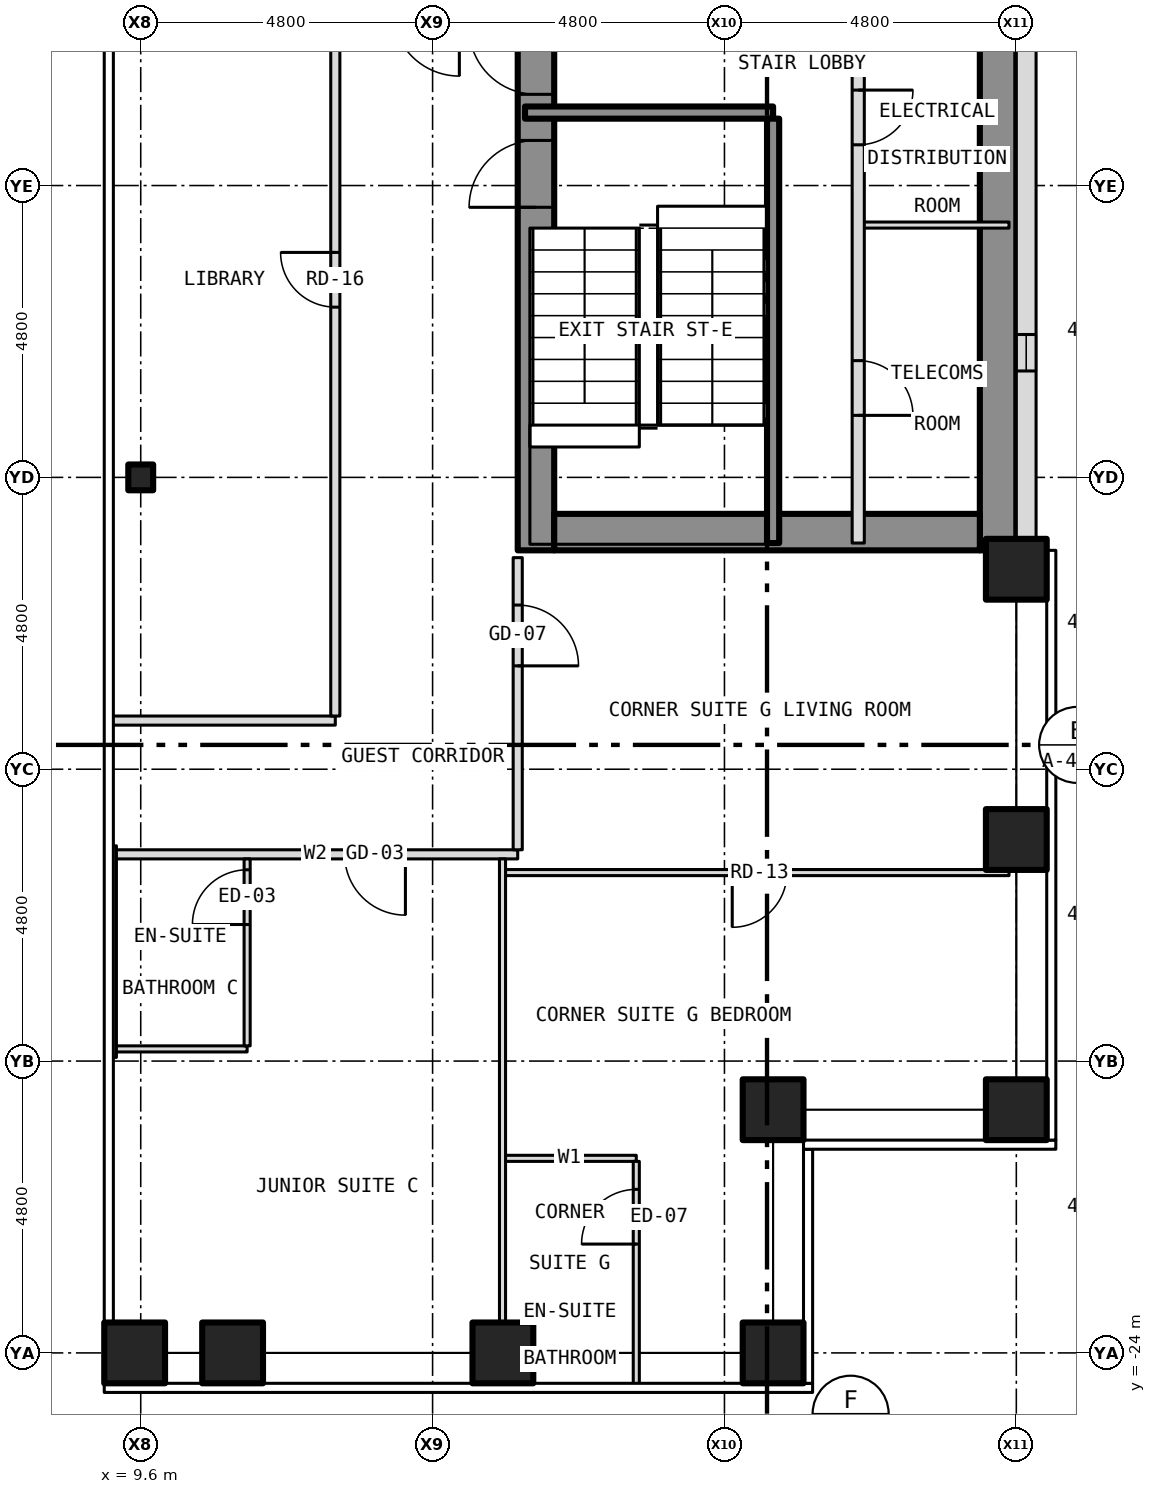
"""IFC4 building model, lengths in metres.
Left out: names, types, materials, properties, quantities, classifications, styles, units other than length and angle.
Written with IfcOpenShell. Run it as: python <this file> out.ifc"""

import sys

from ifc_helpers import new_model, si_unit, direction, frame, frame_2d, origin, origin_2d, place, context, subcontext, project, spatial, rectangle, hollow_rectangle, i_section, extrude, element, fill, save


model = new_model("IFC4")
c1 = context("Model", 3, precision=1e-05, world=origin(), true_north=direction((0.0, 1.0)))
c2 = subcontext(c1, "Body", "Model", "MODEL_VIEW")
j1 = project(units=[si_unit("LENGTHUNIT", "METRE"), si_unit("PLANEANGLEUNIT", "RADIAN")], contexts=[c1])
p1 = place(None, origin())
s1 = spatial("IfcSite", under=j1, at=p1, CompositionType="ELEMENT")
p2 = place(p1, origin())
s2 = spatial("IfcBuilding", under=s1, at=p2, CompositionType="ELEMENT")
p3 = place(p2, frame((0.0, 0.0, 67.0)))
s3 = spatial("IfcBuildingStorey", under=s2, at=p3, CompositionType="ELEMENT", Elevation=67.0)
for number, where, z_axis, x_axis in (
    (1, (11.111, -24.0, -0.15), (0.0, 0.0, 1.0), (1.0, 0.0, 0.0)),
    (2, (15.556, -24.0, -0.15), (0.0, 0.0, 1.0), (1.0, 0.0, 0.0)),
    (3, (20.0, -24.0, -0.15), (0.0, 0.0, 1.0), (1.0, 0.0, 0.0)),
    (4, (24.0, -20.0, -0.15), (0.0, 0.0, 1.0), (1.0, 0.0, 0.0)),
    (5, (24.0, -15.556, -0.15), (0.0, 0.0, 1.0), (1.0, 0.0, 0.0)),
    (6, (24.0, -11.111, -0.15), (0.0, 0.0, 1.0), (1.0, 0.0, 0.0)),
    (7, (20.0, -20.0, -0.15), (0.0, 0.0, 1.0), (1.0, 0.0, 0.0)),
    (8, (9.5, -24.0, -0.15), (0.0, 0.0, 1.0), (1.0, 0.0, 0.0)),
):
    element("IfcColumn", number, at=place(p3, frame(where, z_axis=z_axis, x_axis=x_axis)), inside=s3, PredefinedType="COLUMN", context=c2, shape_type="SweptSolid", body=[
        extrude(hollow_rectangle(XDim=1.0, YDim=1.0, WallThickness=0.06, at=origin_2d()), origin(), (0.0, 0.0, 1.0), 3.5),
    ])
p4 = place(p3, frame((9.6, -9.6, -0.15), z_axis=(0.0, 0.0, 1.0), x_axis=(1.0, 0.0, 0.0)))
e9 = element("IfcColumn", 9, at=p4, inside=s3, PredefinedType="COLUMN", context=c2, shape_type="SweptSolid", body=[
    extrude(i_section(OverallWidth=0.409, OverallDepth=0.424, WebThickness=0.033, FlangeThickness=0.052, at=origin_2d()), origin(), (0.0, 0.0, 1.0), 3.5),
])
p5 = place(p3, frame((16.1, -10.8, 0.0), z_axis=(0.0, 0.0, 1.0), x_axis=(0.0, 1.0, 0.0)))
e10 = element("IfcWall", 10, at=p5, inside=s3, PredefinedType="SHEAR", context=c2, shape_type="SweptSolid", body=[
    extrude(rectangle(XDim=21.6, YDim=0.6, at=frame_2d((10.8, 0.0))), origin(), (0.0, 0.0, 1.0), 3.25),
])
p6 = place(p5, frame((9.4, 0.0, 0.0)))
e11 = element("IfcOpeningElement", 11, at=p6, cuts=e10, PredefinedType="OPENING", context=c2, shape_type="SweptSolid", body=[
    extrude(rectangle(XDim=1.1, YDim=2.1, at=frame_2d((0.55, 1.05))), frame((0.0, 0.312, 0.0), z_axis=(0.0, -1.0, 0.0), x_axis=(1.0, 0.0, 0.0)), (0.0, 0.0, 1.0), 0.624),
])
p7 = place(p5, frame((11.5, 0.0, 0.0)))
e12 = element("IfcOpeningElement", 12, at=p7, cuts=e10, PredefinedType="OPENING", context=c2, shape_type="SweptSolid", body=[
    extrude(rectangle(XDim=1.1, YDim=2.1, at=frame_2d((0.55, 1.05))), frame((0.0, 0.312, 0.0), z_axis=(0.0, -1.0, 0.0), x_axis=(1.0, 0.0, 0.0)), (0.0, 0.0, 1.0), 0.624),
])
p8 = place(p5, frame((13.6, 0.0, 0.0)))
e13 = element("IfcOpeningElement", 13, at=p8, cuts=e10, PredefinedType="OPENING", context=c2, shape_type="SweptSolid", body=[
    extrude(rectangle(XDim=1.1, YDim=2.1, at=frame_2d((0.55, 1.05))), frame((0.0, 0.312, 0.0), z_axis=(0.0, -1.0, 0.0), x_axis=(1.0, 0.0, 0.0)), (0.0, 0.0, 1.0), 0.624),
])
p9 = place(p5, frame((15.7, 0.0, 0.0)))
e14 = element("IfcOpeningElement", 14, at=p9, cuts=e10, PredefinedType="OPENING", context=c2, shape_type="SweptSolid", body=[
    extrude(rectangle(XDim=1.1, YDim=2.1, at=frame_2d((0.55, 1.05))), frame((0.0, 0.312, 0.0), z_axis=(0.0, -1.0, 0.0), x_axis=(1.0, 0.0, 0.0)), (0.0, 0.0, 1.0), 0.624),
])
p10 = place(p5, frame((17.8, 0.0, 0.0)))
e15 = element("IfcOpeningElement", 15, at=p10, cuts=e10, PredefinedType="OPENING", context=c2, shape_type="SweptSolid", body=[
    extrude(rectangle(XDim=1.1, YDim=2.1, at=frame_2d((0.55, 1.05))), frame((0.0, 0.312, 0.0), z_axis=(0.0, -1.0, 0.0), x_axis=(1.0, 0.0, 0.0)), (0.0, 0.0, 1.0), 0.624),
])
p11 = place(p5, frame((5.642, 0.0, 0.0)))
e16 = element("IfcOpeningElement", 16, at=p11, cuts=e10, PredefinedType="OPENING", context=c2, shape_type="SweptSolid", body=[
    extrude(rectangle(XDim=1.1, YDim=2.1, at=frame_2d((0.55, 1.05))), frame((0.0, 0.312, 0.0), z_axis=(0.0, -1.0, 0.0), x_axis=(1.0, 0.0, 0.0)), (0.0, 0.0, 1.0), 0.624),
])
p12 = place(p5, frame((7.5, 0.0, 0.0)))
e17 = element("IfcOpeningElement", 17, at=p12, cuts=e10, PredefinedType="OPENING", context=c2, shape_type="SweptSolid", body=[
    extrude(rectangle(XDim=1.1, YDim=2.1, at=frame_2d((0.55, 1.05))), frame((0.0, 0.312, 0.0), z_axis=(0.0, -1.0, 0.0), x_axis=(1.0, 0.0, 0.0)), (0.0, 0.0, 1.0), 0.624),
])
p13 = place(p3, frame((23.7, -10.8, 0.0), z_axis=(0.0, 0.0, 1.0), x_axis=(0.0, 1.0, 0.0)))
e18 = element("IfcWall", 18, at=p13, inside=s3, PredefinedType="SHEAR", context=c2, shape_type="SweptSolid", body=[
    extrude(rectangle(XDim=21.6, YDim=0.6, at=frame_2d((10.8, 0.0))), origin(), (0.0, 0.0, 1.0), 3.25),
])
p14 = place(p3, frame((16.4, -10.5, 0.0), z_axis=(0.0, 0.0, 1.0), x_axis=(1.0, 0.0, 0.0)))
e19 = element("IfcWall", 19, at=p14, inside=s3, PredefinedType="SHEAR", context=c2, shape_type="SweptSolid", body=[
    extrude(rectangle(XDim=7.0, YDim=0.6, at=frame_2d((3.5, 0.0))), origin(), (0.0, 0.0, 1.0), 3.25),
])
p15 = place(p3, frame((24.163, -10.8, 0.0), z_axis=(0.0, 0.0, 1.0), x_axis=(0.0, 1.0, 0.0)))
e20 = element("IfcWall", 20, at=p15, inside=s3, PredefinedType="SOLIDWALL", context=c2, shape_type="SweptSolid", body=[
    extrude(rectangle(XDim=21.6, YDim=0.325, at=frame_2d((10.8, 0.0))), origin(), (0.0, 0.0, 1.0), 3.5),
])
p16 = place(p15, frame((2.95, 0.0, 1.0)))
e21 = element("IfcOpeningElement", 21, at=p16, cuts=e20, PredefinedType="OPENING", context=c2, shape_type="SweptSolid", body=[
    extrude(rectangle(XDim=0.6, YDim=1.5, at=frame_2d((0.3, 0.75))), frame((0.0, 0.175, 0.0), z_axis=(0.0, -1.0, 0.0), x_axis=(1.0, 0.0, 0.0)), (0.0, 0.0, 1.0), 0.349),
])
p17 = place(p3, frame((15.55, -20.8, 0.0), z_axis=(0.0, 0.0, 1.0), x_axis=(1.0, 0.0, 0.0)))
e22 = element("IfcWall", 22, at=p17, inside=s3, PredefinedType="PARTITIONING", context=c2, shape_type="SweptSolid", body=[
    extrude(rectangle(XDim=2.2, YDim=0.1, at=frame_2d((1.1, 0.0))), origin(), (0.0, 0.0, 1.0), 3.35),
])
p18 = place(p3, frame((9.15, -19.0, 0.0), z_axis=(0.0, 0.0, 1.0), x_axis=(1.0, 0.0, 0.0)))
e23 = element("IfcWall", 23, at=p18, inside=s3, PredefinedType="PARTITIONING", context=c2, shape_type="SweptSolid", body=[
    extrude(rectangle(XDim=2.2, YDim=0.1, at=frame_2d((1.1, 0.0))), origin(), (0.0, 0.0, 1.0), 3.35),
])
p19 = place(p3, frame((15.55, -16.1, 0.0), z_axis=(0.0, 0.0, 1.0), x_axis=(1.0, 0.0, 0.0)))
e24 = element("IfcWall", 24, at=p19, inside=s3, PredefinedType="PARTITIONING", context=c2, shape_type="SweptSolid", body=[
    extrude(rectangle(XDim=8.33, YDim=0.1, at=frame_2d((4.165, 0.0))), origin(), (0.0, 0.0, 1.0), 3.35),
])
p20 = place(p19, frame((3.778, 0.0, 0.0)))
e25 = element("IfcOpeningElement", 25, at=p20, cuts=e24, PredefinedType="OPENING", context=c2, shape_type="SweptSolid", body=[
    extrude(rectangle(XDim=0.9, YDim=2.1, at=frame_2d((0.45, 1.05))), frame((0.0, 0.062, 0.0), z_axis=(0.0, -1.0, 0.0), x_axis=(1.0, 0.0, 0.0)), (0.0, 0.0, 1.0), 0.124),
])
p21 = place(p3, frame((9.15, -15.8, 0.0), z_axis=(0.0, 0.0, 1.0), x_axis=(1.0, 0.0, 0.0)))
e26 = element("IfcWall", 26, at=p21, inside=s3, PredefinedType="PARTITIONING", context=c2, shape_type="SweptSolid", body=[
    extrude(rectangle(XDim=6.65, YDim=0.15, at=frame_2d((3.325, 0.0))), origin(), (0.0, 0.0, 1.0), 3.35),
])
p22 = place(p21, frame((3.803, 0.0, 0.0)))
e27 = element("IfcOpeningElement", 27, at=p22, cuts=e26, PredefinedType="OPENING", context=c2, shape_type="SweptSolid", body=[
    extrude(rectangle(XDim=1.0, YDim=2.1, at=frame_2d((0.5, 1.05))), frame((0.0, 0.087, 0.0), z_axis=(0.0, -1.0, 0.0), x_axis=(1.0, 0.0, 0.0)), (0.0, 0.0, 1.0), 0.174),
])
p23 = place(p3, frame((9.12, -13.6, 0.0), z_axis=(0.0, 0.0, 1.0), x_axis=(1.0, 0.0, 0.0)))
e28 = element("IfcWall", 28, at=p23, inside=s3, PredefinedType="PARTITIONING", context=c2, shape_type="SweptSolid", body=[
    extrude(rectangle(XDim=3.68, YDim=0.15, at=frame_2d((1.84, 0.0))), origin(), (0.0, 0.0, 1.0), 3.35),
])
p24 = place(p3, frame((21.4, -5.45, 0.0), z_axis=(0.0, 0.0, 1.0), x_axis=(1.0, 0.0, 0.0)))
e29 = element("IfcWall", 29, at=p24, inside=s3, PredefinedType="PARTITIONING", context=c2, shape_type="SweptSolid", body=[
    extrude(rectangle(XDim=2.48, YDim=0.1, at=frame_2d((1.24, 0.0))), origin(), (0.0, 0.0, 1.0), 3.25),
])
p25 = place(p3, frame((15.92, -3.6, 0.0), z_axis=(0.0, 0.0, 1.0), x_axis=(1.0, 0.0, 0.0)))
e30 = element("IfcWall", 30, at=p25, inside=s3, PredefinedType="SHEAR", context=c2, shape_type="SweptSolid", body=[
    extrude(rectangle(XDim=4.08, YDim=0.2, at=frame_2d((2.04, 0.0))), origin(), (0.0, 0.0, 1.0), 3.25),
])
p26 = place(p3, frame((9.15, -19.14, 0.0), z_axis=(0.0, 0.0, 1.0), x_axis=(0.0, 1.0, 0.0)))
e31 = element("IfcWall", 31, at=p26, inside=s3, PredefinedType="PARTITIONING", context=c2, shape_type="SweptSolid", body=[
    extrude(rectangle(XDim=3.48, YDim=0.1, at=frame_2d((1.74, 0.0))), origin(), (0.0, 0.0, 1.0), 2.733),
])
p27 = place(p3, frame((11.35, -18.95, 0.0), z_axis=(0.0, 0.0, 1.0), x_axis=(0.0, 1.0, 0.0)))
e32 = element("IfcWall", 32, at=p27, inside=s3, PredefinedType="PARTITIONING", context=c2, shape_type="SweptSolid", body=[
    extrude(rectangle(XDim=3.075, YDim=0.1, at=frame_2d((1.538, 0.0))), origin(), (0.0, 0.0, 1.0), 3.35),
])
p28 = place(p27, frame((1.996, 0.0, 0.0)))
e33 = element("IfcOpeningElement", 33, at=p28, cuts=e32, PredefinedType="OPENING", context=c2, shape_type="SweptSolid", body=[
    extrude(rectangle(XDim=0.9, YDim=2.1, at=frame_2d((0.45, 1.05))), frame((0.0, 0.062, 0.0), z_axis=(0.0, -1.0, 0.0), x_axis=(1.0, 0.0, 0.0)), (0.0, 0.0, 1.0), 0.124),
])
p29 = place(p3, frame((12.8, -13.525, 0.0), z_axis=(0.0, 0.0, 1.0), x_axis=(0.0, 1.0, 0.0)))
e34 = element("IfcWall", 34, at=p29, inside=s3, PredefinedType="PARTITIONING", context=c2, shape_type="SweptSolid", body=[
    extrude(rectangle(XDim=11.525, YDim=0.15, at=frame_2d((5.762, 0.0))), origin(), (0.0, 0.0, 1.0), 3.35),
])
p30 = place(p29, frame((6.725, 0.0, 0.0)))
e35 = element("IfcOpeningElement", 35, at=p30, cuts=e34, PredefinedType="OPENING", context=c2, shape_type="SweptSolid", body=[
    extrude(rectangle(XDim=0.9, YDim=2.1, at=frame_2d((0.45, 1.05))), frame((0.0, 0.087, 0.0), z_axis=(0.0, -1.0, 0.0), x_axis=(1.0, 0.0, 0.0)), (0.0, 0.0, 1.0), 0.174),
])
p31 = place(p3, frame((15.55, -23.88, 0.0), z_axis=(0.0, 0.0, 1.0), x_axis=(0.0, 1.0, 0.0)))
e36 = element("IfcWall", 36, at=p31, inside=s3, PredefinedType="PARTITIONING", context=c2, shape_type="SweptSolid", body=[
    extrude(rectangle(XDim=8.005, YDim=0.1, at=frame_2d((4.002, 0.0))), origin(), (0.0, 0.0, 1.0), 3.35),
])
p32 = place(p3, frame((15.8, -15.725, 0.0), z_axis=(0.0, 0.0, 1.0), x_axis=(0.0, 1.0, 0.0)))
e37 = element("IfcWall", 37, at=p32, inside=s3, PredefinedType="PARTITIONING", context=c2, shape_type="SweptSolid", body=[
    extrude(rectangle(XDim=4.805, YDim=0.15, at=frame_2d((2.403, 0.0))), origin(), (0.0, 0.0, 1.0), 3.35),
])
p33 = place(p32, frame((3.025, 0.0, 0.0)))
e38 = element("IfcOpeningElement", 38, at=p33, cuts=e37, PredefinedType="OPENING", context=c2, shape_type="SweptSolid", body=[
    extrude(rectangle(XDim=1.0, YDim=2.1, at=frame_2d((0.5, 1.05))), frame((0.0, 0.087, 0.0), z_axis=(0.0, -1.0, 0.0), x_axis=(1.0, 0.0, 0.0)), (0.0, 0.0, 1.0), 0.174),
])
p34 = place(p3, frame((17.75, -24.53, 0.0), z_axis=(0.0, 0.0, 1.0), x_axis=(0.0, 1.0, 0.0)))
e39 = element("IfcWall", 39, at=p34, inside=s3, PredefinedType="PARTITIONING", context=c2, shape_type="SweptSolid", body=[
    extrude(rectangle(XDim=3.68, YDim=0.1, at=frame_2d((1.84, 0.0))), origin(), (0.0, 0.0, 1.0), 3.35),
])
p35 = place(p34, frame((2.32, 0.0, 0.0)))
e40 = element("IfcOpeningElement", 40, at=p35, cuts=e39, PredefinedType="OPENING", context=c2, shape_type="SweptSolid", body=[
    extrude(rectangle(XDim=0.9, YDim=2.1, at=frame_2d((0.45, 1.05))), frame((0.0, 0.062, 0.0), z_axis=(0.0, -1.0, 0.0), x_axis=(1.0, 0.0, 0.0)), (0.0, 0.0, 1.0), 0.124),
])
p36 = place(p3, frame((20.0, -10.68, 0.0), z_axis=(0.0, 0.0, 1.0), x_axis=(0.0, 1.0, 0.0)))
e41 = element("IfcWall", 41, at=p36, inside=s3, PredefinedType="SHEAR", context=c2, shape_type="SweptSolid", body=[
    extrude(rectangle(XDim=6.98, YDim=0.2, at=frame_2d((3.49, 0.0))), origin(), (0.0, 0.0, 1.0), 3.25),
])
p37 = place(p3, frame((21.4, -10.68, 0.0), z_axis=(0.0, 0.0, 1.0), x_axis=(0.0, 1.0, 0.0)))
e42 = element("IfcWall", 42, at=p37, inside=s3, PredefinedType="PARTITIONING", context=c2, shape_type="SweptSolid", body=[
    extrude(rectangle(XDim=8.68, YDim=0.2, at=frame_2d((4.34, 0.0))), origin(), (0.0, 0.0, 1.0), 3.25),
])
p38 = place(p37, frame((2.1, 0.0, 0.0)))
e43 = element("IfcOpeningElement", 43, at=p38, cuts=e42, PredefinedType="OPENING", context=c2, shape_type="SweptSolid", body=[
    extrude(rectangle(XDim=0.9, YDim=2.1, at=frame_2d((0.45, 1.05))), frame((0.0, 0.112, 0.0), z_axis=(0.0, -1.0, 0.0), x_axis=(1.0, 0.0, 0.0)), (0.0, 0.0, 1.0), 0.224),
])
p39 = place(p37, frame((6.55, 0.0, 0.0)))
e44 = element("IfcOpeningElement", 44, at=p39, cuts=e42, PredefinedType="OPENING", context=c2, shape_type="SweptSolid", body=[
    extrude(rectangle(XDim=0.9, YDim=2.1, at=frame_2d((0.45, 1.05))), frame((0.0, 0.112, 0.0), z_axis=(0.0, -1.0, 0.0), x_axis=(1.0, 0.0, 0.0)), (0.0, 0.0, 1.0), 0.224),
])
p40 = place(p16, origin())
e45 = element("IfcWindow", 45, at=p40, inside=s3, PartitioningType="SINGLE_PANEL", PredefinedType="WINDOW", context=c2, shape_type="SweptSolid", body=[
    extrude(rectangle(XDim=0.6, YDim=1.5, at=frame_2d((0.3, 0.75))), frame((0.0, -0.073, 0.0), z_axis=(0.0, -1.0, 0.0), x_axis=(1.0, 0.0, 0.0)), (0.0, 0.0, 1.0), 0.06),
])
fill(e21, e45)
p41 = place(p11, origin())
e46 = element("IfcDoor", 46, at=p41, inside=s3, OperationType="SINGLE_SWING_LEFT", PredefinedType="DOOR", context=c2, shape_type="SweptSolid", body=[
    extrude(rectangle(XDim=1.1, YDim=2.1, at=frame_2d((0.55, 1.05))), frame((0.0, 0.025, 0.0), z_axis=(0.0, -1.0, 0.0), x_axis=(1.0, 0.0, 0.0)), (0.0, 0.0, 1.0), 0.05),
])
fill(e16, e46)
p42 = place(p12, origin())
e47 = element("IfcDoor", 47, at=p42, inside=s3, OperationType="SINGLE_SWING_RIGHT", PredefinedType="DOOR", context=c2, shape_type="SweptSolid", body=[
    extrude(rectangle(XDim=1.1, YDim=2.1, at=frame_2d((0.55, 1.05))), frame((0.0, 0.025, 0.0), z_axis=(0.0, -1.0, 0.0), x_axis=(1.0, 0.0, 0.0)), (0.0, 0.0, 1.0), 0.05),
])
fill(e17, e47)
p43 = place(p38, origin())
e48 = element("IfcDoor", 48, at=p43, inside=s3, OperationType="SINGLE_SWING_LEFT", PredefinedType="DOOR", context=c2, shape_type="SweptSolid", body=[
    extrude(rectangle(XDim=0.9, YDim=2.1, at=frame_2d((0.45, 1.05))), frame((0.0, 0.025, 0.0), z_axis=(0.0, -1.0, 0.0), x_axis=(1.0, 0.0, 0.0)), (0.0, 0.0, 1.0), 0.05),
])
fill(e43, e48)
p44 = place(p39, origin())
e49 = element("IfcDoor", 49, at=p44, inside=s3, OperationType="SINGLE_SWING_RIGHT", PredefinedType="DOOR", context=c2, shape_type="SweptSolid", body=[
    extrude(rectangle(XDim=0.9, YDim=2.1, at=frame_2d((0.45, 1.05))), frame((0.0, 0.025, 0.0), z_axis=(0.0, -1.0, 0.0), x_axis=(1.0, 0.0, 0.0)), (0.0, 0.0, 1.0), 0.05),
])
fill(e44, e49)
p45 = place(p22, origin())
e50 = element("IfcDoor", 50, at=p45, inside=s3, OperationType="SINGLE_SWING_RIGHT", PredefinedType="DOOR", context=c2, shape_type="SweptSolid", body=[
    extrude(rectangle(XDim=1.0, YDim=2.1, at=frame_2d((0.5, 1.05))), frame((0.0, 0.025, 0.0), z_axis=(0.0, -1.0, 0.0), x_axis=(1.0, 0.0, 0.0)), (0.0, 0.0, 1.0), 0.05),
])
fill(e27, e50)
p46 = place(p28, origin())
e51 = element("IfcDoor", 51, at=p46, inside=s3, OperationType="SINGLE_SWING_LEFT", PredefinedType="DOOR", context=c2, shape_type="SweptSolid", body=[
    extrude(rectangle(XDim=0.9, YDim=2.1, at=frame_2d((0.45, 1.05))), frame((0.0, 0.025, 0.0), z_axis=(0.0, -1.0, 0.0), x_axis=(1.0, 0.0, 0.0)), (0.0, 0.0, 1.0), 0.05),
])
fill(e33, e51)
p47 = place(p33, origin())
e52 = element("IfcDoor", 52, at=p47, inside=s3, OperationType="SINGLE_SWING_LEFT", PredefinedType="DOOR", context=c2, shape_type="SweptSolid", body=[
    extrude(rectangle(XDim=1.0, YDim=2.1, at=frame_2d((0.5, 1.05))), frame((0.0, 0.025, 0.0), z_axis=(0.0, -1.0, 0.0), x_axis=(1.0, 0.0, 0.0)), (0.0, 0.0, 1.0), 0.05),
])
fill(e38, e52)
p48 = place(p20, origin())
e53 = element("IfcDoor", 53, at=p48, inside=s3, OperationType="SINGLE_SWING_LEFT", PredefinedType="DOOR", context=c2, shape_type="SweptSolid", body=[
    extrude(rectangle(XDim=0.9, YDim=2.1, at=frame_2d((0.45, 1.05))), frame((0.0, 0.025, 0.0), z_axis=(0.0, -1.0, 0.0), x_axis=(1.0, 0.0, 0.0)), (0.0, 0.0, 1.0), 0.05),
])
fill(e25, e53)
p49 = place(p35, origin())
e54 = element("IfcDoor", 54, at=p49, inside=s3, OperationType="SINGLE_SWING_LEFT", PredefinedType="DOOR", context=c2, shape_type="SweptSolid", body=[
    extrude(rectangle(XDim=0.9, YDim=2.1, at=frame_2d((0.45, 1.05))), frame((0.0, 0.025, 0.0), z_axis=(0.0, -1.0, 0.0), x_axis=(1.0, 0.0, 0.0)), (0.0, 0.0, 1.0), 0.05),
])
fill(e40, e54)
p50 = place(p30, origin())
e55 = element("IfcDoor", 55, at=p50, inside=s3, OperationType="SINGLE_SWING_RIGHT", PredefinedType="DOOR", context=c2, shape_type="SweptSolid", body=[
    extrude(rectangle(XDim=0.9, YDim=2.1, at=frame_2d((0.45, 1.05))), frame((0.0, 0.025, 0.0), z_axis=(0.0, -1.0, 0.0), x_axis=(1.0, 0.0, 0.0)), (0.0, 0.0, 1.0), 0.05),
])
fill(e35, e55)
save(model, sys.argv[1])
